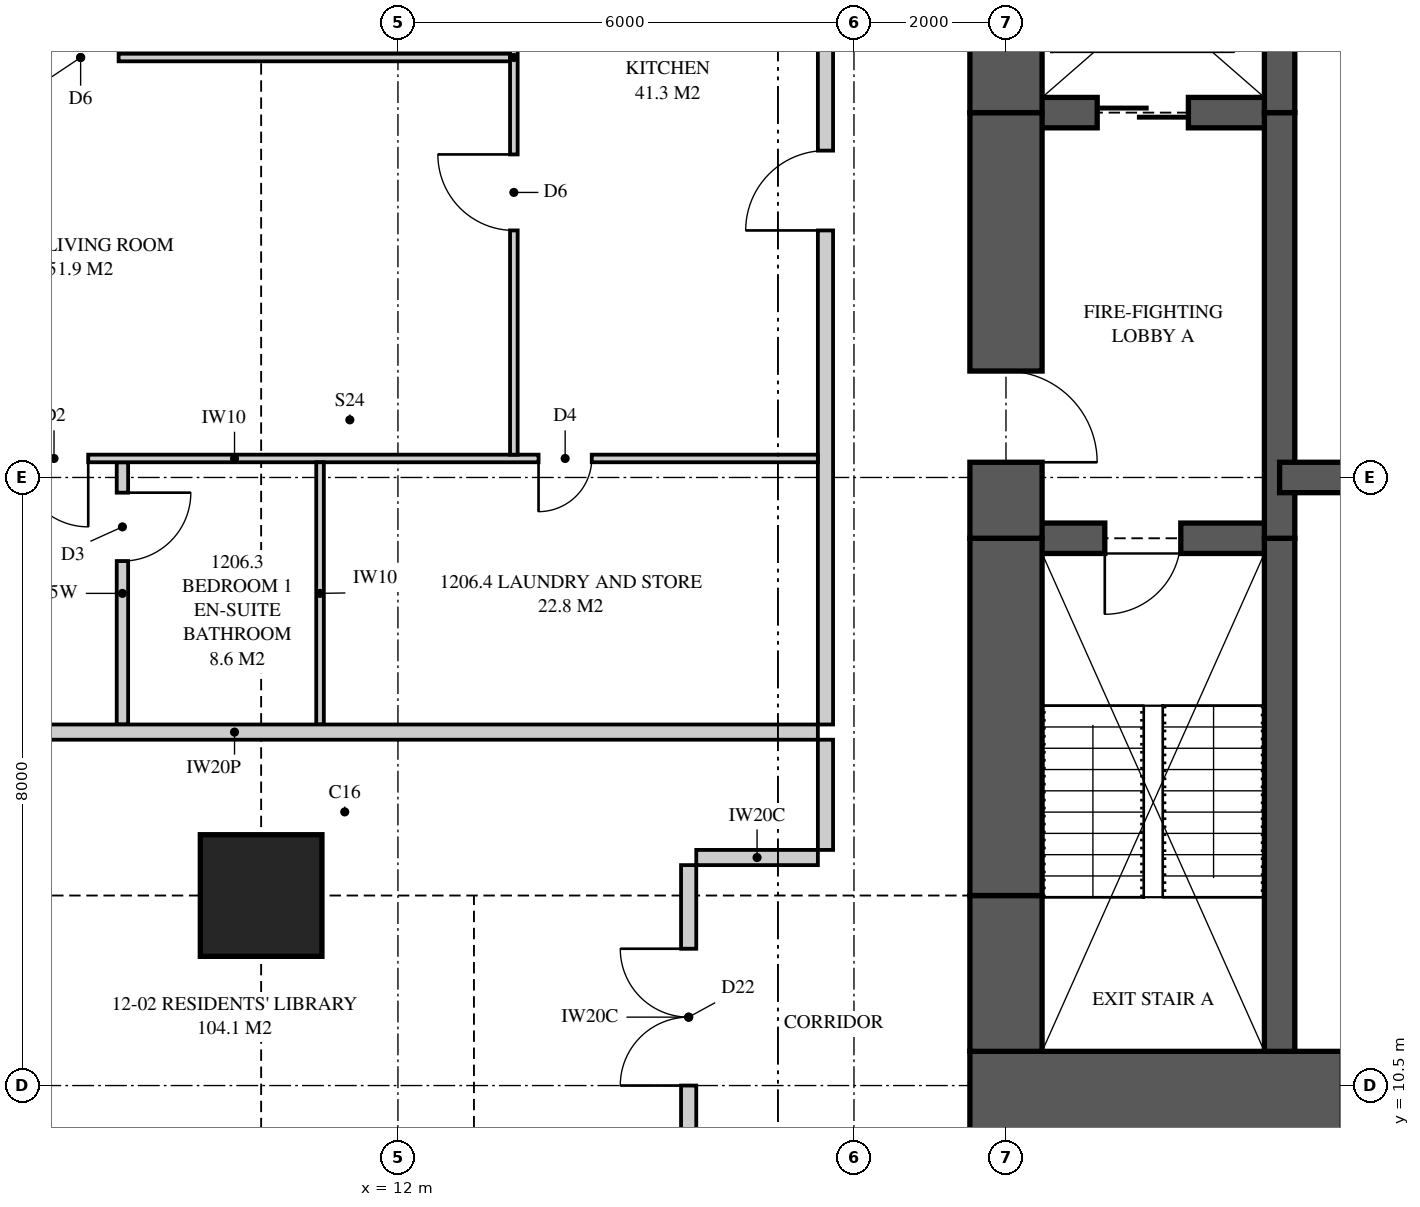
"""IFC4 building model, lengths in metres.
Left out: names, types, materials, properties, quantities, classifications, styles, units other than length and angle.
Written with IfcOpenShell. Run it as: python <this file> out.ifc"""

import sys

from ifc_helpers import new_model, si_unit, direction, frame, frame_2d, origin, origin_2d, place, context, subcontext, project, spatial, polyline, rectangle, outline, extrude, element, fill, save


model = new_model("IFC4")
c1 = context("Model", 3, precision=1e-05, world=origin(), true_north=direction((0.0, 1.0)))
c2 = subcontext(c1, "Body", "Model", "MODEL_VIEW")
j1 = project(units=[si_unit("LENGTHUNIT", "METRE"), si_unit("PLANEANGLEUNIT", "RADIAN")], contexts=[c1])
p1 = place(None, origin())
s1 = spatial("IfcSite", under=j1, at=p1, CompositionType="ELEMENT")
p2 = place(p1, origin())
s2 = spatial("IfcBuilding", under=s1, at=p2, CompositionType="ELEMENT")
p3 = place(p2, frame((0.0, 0.0, 47.8)))
s3 = spatial("IfcBuildingStorey", under=s2, at=p3, CompositionType="ELEMENT", Elevation=47.8)
p4 = place(p3, frame((10.2, 13.0, 0.0), z_axis=(0.0, 0.0, 1.0), x_axis=(1.0, 0.0, 0.0)))
e1 = element("IfcColumn", 1, at=p4, inside=s3, PredefinedType="COLUMN", context=c2, shape_type="SweptSolid", body=[
    extrude(rectangle(XDim=1.6, YDim=1.6, at=origin_2d()), origin(), (0.0, 0.0, 1.0), 3.35),
])
p5 = place(p3, frame((19.525, 10.125, 0.0), z_axis=(0.0, 0.0, 1.0), x_axis=(1.0, 0.0, 0.0)))
e2 = element("IfcWall", 2, at=p5, inside=s3, PredefinedType="SHEAR", context=c2, shape_type="SweptSolid", body=[
    extrude(rectangle(XDim=6.475, YDim=1.65, at=frame_2d((3.238, 0.0))), origin(), (0.0, 0.0, 1.0), 3.35),
])
p6 = place(p5, frame((4.9, 0.0, 0.0)))
e3 = element("IfcOpeningElement", 3, at=p6, cuts=e2, PredefinedType="OPENING", context=c2, shape_type="SweptSolid", body=[
    extrude(rectangle(XDim=0.75, YDim=2.1, at=frame_2d((0.375, 1.05))), frame((0.0, 0.835, 0.0), z_axis=(0.0, -1.0, 0.0), x_axis=(1.0, 0.0, 0.0)), (0.0, 0.0, 1.0), 1.67),
])
p7 = place(p3, frame((20.0, 26.05, 0.0), z_axis=(0.0, 0.0, 1.0), x_axis=(0.0, -1.0, 0.0)))
e4 = element("IfcWall", 4, at=p7, inside=s3, PredefinedType="SHEAR", context=c2, shape_type="SweptSolid", body=[
    extrude(rectangle(XDim=2.75, YDim=0.95, at=frame_2d((1.375, 0.0))), origin(), (0.0, 0.0, 1.0), 3.35),
])
p8 = place(p3, frame((20.0, 23.3, 0.0), z_axis=(0.0, 0.0, 1.0), x_axis=(0.0, -1.0, 0.0)))
e5 = element("IfcWall", 5, at=p8, inside=s3, PredefinedType="SHEAR", context=c2, shape_type="SweptSolid", body=[
    extrude(rectangle(XDim=5.6, YDim=0.95, at=frame_2d((2.8, 0.0))), origin(), (0.0, 0.0, 1.0), 3.35),
])
p9 = place(p8, frame((3.4, 0.0, 0.0)))
e6 = element("IfcOpeningElement", 6, at=p9, cuts=e5, PredefinedType="OPENING", context=c2, shape_type="SweptSolid", body=[
    extrude(rectangle(XDim=1.2, YDim=2.2, at=frame_2d((0.6, 1.1))), frame((0.0, 0.485, 0.0), z_axis=(0.0, -1.0, 0.0), x_axis=(1.0, 0.0, 0.0)), (0.0, 0.0, 1.0), 0.97),
])
p10 = place(p3, frame((20.0, 17.7, 0.0), z_axis=(0.0, 0.0, 1.0), x_axis=(0.0, -1.0, 0.0)))
e7 = element("IfcWall", 7, at=p10, inside=s3, PredefinedType="SHEAR", context=c2, shape_type="SweptSolid", body=[
    extrude(rectangle(XDim=4.7, YDim=0.95, at=frame_2d((2.35, 0.0))), origin(), (0.0, 0.0, 1.0), 3.35),
])
p11 = place(p3, frame((20.0, 13.0, 0.0), z_axis=(0.0, 0.0, 1.0), x_axis=(0.0, -1.0, 0.0)))
e8 = element("IfcWall", 8, at=p11, inside=s3, PredefinedType="SHEAR", context=c2, shape_type="SweptSolid", body=[
    extrude(rectangle(XDim=2.05, YDim=0.95, at=frame_2d((1.025, 0.0))), origin(), (0.0, 0.0, 1.0), 3.35),
])
p12 = place(p3, frame((23.6, 10.95, 0.0), z_axis=(0.0, 0.0, 1.0), x_axis=(0.0, 1.0, 0.0)))
e9 = element("IfcWall", 9, at=p12, inside=s3, PredefinedType="SHEAR", context=c2, shape_type="SweptSolid", body=[
    extrude(rectangle(XDim=6.75, YDim=0.4, at=frame_2d((3.375, 0.0))), origin(), (0.0, 0.0, 1.0), 3.35),
])
p13 = place(p3, frame((23.6, 17.7, 0.0), z_axis=(0.0, 0.0, 1.0), x_axis=(0.0, 1.0, 0.0)))
e10 = element("IfcWall", 10, at=p13, inside=s3, PredefinedType="SHEAR", context=c2, shape_type="SweptSolid", body=[
    extrude(rectangle(XDim=5.6, YDim=0.4, at=frame_2d((2.8, 0.0))), origin(), (0.0, 0.0, 1.0), 3.35),
])
p14 = place(p3, frame((23.6, 23.3, 0.0), z_axis=(0.0, 0.0, 1.0), x_axis=(0.0, 1.0, 0.0)))
e11 = element("IfcWall", 11, at=p14, inside=s3, PredefinedType="SHEAR", context=c2, shape_type="SweptSolid", body=[
    extrude(rectangle(XDim=2.75, YDim=0.4, at=frame_2d((1.375, 0.0))), origin(), (0.0, 0.0, 1.0), 3.35),
])
p15 = place(p3, frame((20.0, 17.7, 0.0), z_axis=(0.0, 0.0, 1.0), x_axis=(1.0, 0.0, 0.0)))
e12 = element("IfcWall", 12, at=p15, inside=s3, PredefinedType="SHEAR", context=c2, shape_type="SweptSolid", body=[
    extrude(rectangle(XDim=3.6, YDim=0.4, at=frame_2d((1.8, 0.0))), origin(), (0.0, 0.0, 1.0), 3.35),
])
p16 = place(p15, frame((1.3, 0.0, 0.0)))
e13 = element("IfcOpeningElement", 13, at=p16, cuts=e12, PredefinedType="OPENING", context=c2, shape_type="SweptSolid", body=[
    extrude(rectangle(XDim=1.0, YDim=2.1, at=frame_2d((0.5, 1.05))), frame((0.0, 0.21, 0.0), z_axis=(0.0, -1.0, 0.0), x_axis=(1.0, 0.0, 0.0)), (0.0, 0.0, 1.0), 0.42),
])
p17 = place(p3, frame((20.0, 23.3, 0.0), z_axis=(0.0, 0.0, 1.0), x_axis=(1.0, 0.0, 0.0)))
e14 = element("IfcWall", 14, at=p17, inside=s3, PredefinedType="SHEAR", context=c2, shape_type="SweptSolid", body=[
    extrude(rectangle(XDim=3.6, YDim=0.4, at=frame_2d((1.8, 0.0))), origin(), (0.0, 0.0, 1.0), 3.35),
])
p18 = place(p17, frame((1.2, 0.0, 0.0)))
e15 = element("IfcOpeningElement", 15, at=p18, cuts=e14, PredefinedType="OPENING", context=c2, shape_type="SweptSolid", body=[
    extrude(rectangle(XDim=1.2, YDim=2.1, at=frame_2d((0.6, 1.05))), frame((0.0, 0.21, 0.0), z_axis=(0.0, -1.0, 0.0), x_axis=(1.0, 0.0, 0.0)), (0.0, 0.0, 1.0), 0.42),
])
p19 = place(p3, frame((23.6, 18.5, 0.0), z_axis=(0.0, 0.0, 1.0), x_axis=(1.0, 0.0, 0.0)))
e16 = element("IfcWall", 16, at=p19, inside=s3, PredefinedType="SHEAR", context=c2, shape_type="SweptSolid", body=[
    extrude(rectangle(XDim=2.4, YDim=0.4, at=frame_2d((1.2, 0.0))), origin(), (0.0, 0.0, 1.0), 3.35),
])
p20 = place(p3, frame((2.175, 15.15, 0.0), z_axis=(0.0, 0.0, 1.0), x_axis=(1.0, 0.0, 0.0)))
e17 = element("IfcWall", 17, at=p20, inside=s3, PredefinedType="PARTITIONING", context=c2, shape_type="SweptSolid", body=[
    extrude(outline(polyline([(0.529, 2.15), (0.0, 2.15), (0.0, 0.0), (0.529, 0.0), (0.529, 0.021), (1.021, 0.021), (1.021, 0.0), (15.35, 0.0), (15.35, 3.11), (9.335, 3.11), (9.335, 2.51), (6.715, 2.51), (6.715, 3.11), (1.685, 3.11), (1.685, 2.15), (1.021, 2.15), (1.021, 2.129), (0.529, 2.129), (0.529, 2.15)])), frame((0.0, 0.1, 0.0), z_axis=(0.0, -1.0, 0.0), x_axis=(1.0, 0.0, 0.0)), (0.0, 0.0, 1.0), 0.2),
])
p21 = place(p3, frame((17.625, 15.25, 0.0), z_axis=(0.0, 0.0, 1.0), x_axis=(0.0, 1.0, 0.0)))
e18 = element("IfcWall", 18, at=p21, inside=s3, PredefinedType="PARTITIONING", context=c2, shape_type="SweptSolid", body=[
    extrude(outline(polyline([(0.0, 0.0), (14.0, 0.0), (14.0, 3.11), (10.087, 3.11), (10.087, 2.541), (9.413, 2.541), (9.413, 3.11), (0.0, 3.11), (0.0, 0.0)])), frame((0.0, 0.1, 0.0), z_axis=(0.0, -1.0, 0.0), x_axis=(1.0, 0.0, 0.0)), (0.0, 0.0, 1.0), 0.2),
])
p22 = place(p21, frame((6.5, 0.0, 0.0)))
e19 = element("IfcOpeningElement", 19, at=p22, cuts=e18, PredefinedType="OPENING", context=c2, shape_type="SweptSolid", body=[
    extrude(rectangle(XDim=1.05, YDim=2.2, at=frame_2d((0.525, 1.1))), frame((0.0, 0.11, 0.0), z_axis=(0.0, -1.0, 0.0), x_axis=(1.0, 0.0, 0.0)), (0.0, 0.0, 1.0), 0.22),
])
p23 = place(p3, frame((2.175, 18.75, 0.0), z_axis=(0.0, 0.0, 1.0), x_axis=(1.0, 0.0, 0.0)))
e20 = element("IfcWall", 20, at=p23, inside=s3, PredefinedType="PARTITIONING", context=c2, shape_type="SweptSolid", body=[
    extrude(outline(polyline([(0.0, 0.0), (15.35, 0.0), (15.35, 3.11), (9.285, 3.11), (9.285, 2.51), (6.765, 2.51), (6.765, 3.11), (1.635, 3.11), (1.635, 2.15), (0.0, 2.15), (0.0, 3.11), (0.0, 0.0)])), frame((0.0, 0.05, 0.0), z_axis=(0.0, -1.0, 0.0), x_axis=(1.0, 0.0, 0.0)), (0.0, 0.0, 1.0), 0.1),
])
p24 = place(p23, frame((4.85, 0.0, 0.0)))
e21 = element("IfcOpeningElement", 21, at=p24, cuts=e20, PredefinedType="OPENING", context=c2, shape_type="SweptSolid", body=[
    extrude(rectangle(XDim=0.9, YDim=2.1, at=frame_2d((0.45, 1.05))), frame((0.0, 0.06, 0.0), z_axis=(0.0, -1.0, 0.0), x_axis=(1.0, 0.0, 0.0)), (0.0, 0.0, 1.0), 0.12),
])
p25 = place(p23, frame((11.675, 0.0, 0.0)))
e22 = element("IfcOpeningElement", 22, at=p25, cuts=e20, PredefinedType="OPENING", context=c2, shape_type="SweptSolid", body=[
    extrude(rectangle(XDim=0.7, YDim=2.1, at=frame_2d((0.35, 1.05))), frame((0.0, 0.06, 0.0), z_axis=(0.0, -1.0, 0.0), x_axis=(1.0, 0.0, 0.0)), (0.0, 0.0, 1.0), 0.12),
])
p26 = place(p3, frame((8.375, 15.25, 0.0), z_axis=(0.0, 0.0, 1.0), x_axis=(0.0, 1.0, 0.0)))
e23 = element("IfcWall", 23, at=p26, inside=s3, PredefinedType="PLUMBINGWALL", context=c2, shape_type="SweptSolid", body=[
    extrude(rectangle(XDim=3.45, YDim=0.15, at=frame_2d((1.725, 0.0))), origin(), (0.0, 0.0, 1.0), 3.11),
])
p27 = place(p26, frame((2.15, 0.0, 0.0)))
e24 = element("IfcOpeningElement", 24, at=p27, cuts=e23, PredefinedType="OPENING", context=c2, shape_type="SweptSolid", body=[
    extrude(rectangle(XDim=0.9, YDim=2.1, at=frame_2d((0.45, 1.05))), frame((0.0, 0.085, 0.0), z_axis=(0.0, -1.0, 0.0), x_axis=(1.0, 0.0, 0.0)), (0.0, 0.0, 1.0), 0.17),
])
p28 = place(p3, frame((10.975, 15.25, 0.0), z_axis=(0.0, 0.0, 1.0), x_axis=(0.0, 1.0, 0.0)))
e25 = element("IfcWall", 25, at=p28, inside=s3, PredefinedType="PARTITIONING", context=c2, shape_type="SweptSolid", body=[
    extrude(outline(polyline([(0.0, 0.0), (3.45, 0.0), (3.45, 3.11), (3.45, 2.51), (0.0, 2.51), (0.0, 3.11), (0.0, 0.0)])), frame((0.0, 0.05, 0.0), z_axis=(0.0, -1.0, 0.0), x_axis=(1.0, 0.0, 0.0)), (0.0, 0.0, 1.0), 0.1),
])
p29 = place(p3, frame((13.525, 18.8, 0.0), z_axis=(0.0, 0.0, 1.0), x_axis=(0.0, 1.0, 0.0)))
e26 = element("IfcWall", 26, at=p29, inside=s3, PredefinedType="PARTITIONING", context=c2, shape_type="SweptSolid", body=[
    extrude(outline(polyline([(0.0, 0.0), (10.45, 0.0), (10.45, 3.11), (6.487, 3.11), (6.487, 2.541), (5.913, 2.541), (5.913, 3.11), (0.0, 3.11), (0.0, 0.0)])), frame((0.0, 0.05, 0.0), z_axis=(0.0, -1.0, 0.0), x_axis=(1.0, 0.0, 0.0)), (0.0, 0.0, 1.0), 0.1),
])
p30 = place(p29, frame((2.95, 0.0, 0.0)))
e27 = element("IfcOpeningElement", 27, at=p30, cuts=e26, PredefinedType="OPENING", context=c2, shape_type="SweptSolid", body=[
    extrude(rectangle(XDim=1.0, YDim=2.1, at=frame_2d((0.5, 1.05))), frame((0.0, 0.06, 0.0), z_axis=(0.0, -1.0, 0.0), x_axis=(1.0, 0.0, 0.0)), (0.0, 0.0, 1.0), 0.12),
])
p31 = place(p3, frame((2.175, 24.025, 0.0), z_axis=(0.0, 0.0, 1.0), x_axis=(1.0, 0.0, 0.0)))
e28 = element("IfcWall", 28, at=p31, inside=s3, PredefinedType="PARTITIONING", context=c2, shape_type="SweptSolid", body=[
    extrude(outline(polyline([(0.529, 2.15), (0.0, 2.15), (0.0, 0.0), (0.529, 0.0), (0.529, 0.798), (1.021, 0.798), (1.021, 0.0), (11.3, 0.0), (11.3, 3.11), (9.285, 3.11), (9.285, 2.51), (6.765, 2.51), (6.765, 3.11), (1.635, 3.11), (1.635, 2.15), (1.021, 2.15), (1.021, 1.352), (0.529, 1.352), (0.529, 2.15)])), frame((0.0, 0.05, 0.0), z_axis=(0.0, -1.0, 0.0), x_axis=(1.0, 0.0, 0.0)), (0.0, 0.0, 1.0), 0.1),
])
p32 = place(p31, frame((5.15, 0.0, 0.0)))
e29 = element("IfcOpeningElement", 29, at=p32, cuts=e28, PredefinedType="OPENING", context=c2, shape_type="SweptSolid", body=[
    extrude(rectangle(XDim=1.0, YDim=2.1, at=frame_2d((0.5, 1.05))), frame((0.0, 0.06, 0.0), z_axis=(0.0, -1.0, 0.0), x_axis=(1.0, 0.0, 0.0)), (0.0, 0.0, 1.0), 0.12),
])
p33 = place(p3, frame((17.625, 13.6, 0.0), z_axis=(0.0, 0.0, 1.0), x_axis=(0.0, 1.0, 0.0)))
e30 = element("IfcWall", 30, at=p33, inside=s3, PredefinedType="PARTITIONING", context=c2, shape_type="SweptSolid", body=[
    extrude(rectangle(XDim=1.45, YDim=0.2, at=frame_2d((0.725, 0.0))), origin(), (0.0, 0.0, 1.0), 3.11),
])
p34 = place(p3, frame((15.825, 9.4, 0.0), z_axis=(0.0, 0.0, 1.0), x_axis=(0.0, 1.0, 0.0)))
e31 = element("IfcWall", 31, at=p34, inside=s3, PredefinedType="PARTITIONING", context=c2, shape_type="SweptSolid", body=[
    extrude(outline(polyline([(0.0, 0.0), (4.0, 0.0), (4.0, 3.11), (3.937, 3.11), (3.937, 2.541), (3.263, 2.541), (3.263, 3.11), (0.0, 3.11), (0.0, 0.0)])), frame((0.0, 0.1, 0.0), z_axis=(0.0, -1.0, 0.0), x_axis=(1.0, 0.0, 0.0)), (0.0, 0.0, 1.0), 0.2),
])
p35 = place(p34, frame((1.1, 0.0, 0.0)))
e32 = element("IfcOpeningElement", 32, at=p35, cuts=e31, PredefinedType="OPENING", context=c2, shape_type="SweptSolid", body=[
    extrude(rectangle(XDim=1.8, YDim=2.1, at=frame_2d((0.9, 1.05))), frame((0.0, 0.11, 0.0), z_axis=(0.0, -1.0, 0.0), x_axis=(1.0, 0.0, 0.0)), (0.0, 0.0, 1.0), 0.22),
])
p36 = place(p3, frame((17.525, 13.5, 0.0), z_axis=(0.0, 0.0, 1.0), x_axis=(-1.0, 0.0, 0.0)))
e33 = element("IfcWall", 33, at=p36, inside=s3, PredefinedType="PARTITIONING", context=c2, shape_type="SweptSolid", body=[
    extrude(rectangle(XDim=1.6, YDim=0.2, at=frame_2d((0.8, 0.0))), origin(), (0.0, 0.0, 1.0), 3.11),
])
p37 = place(p35, origin())
e34 = element("IfcDoor", 34, at=p37, inside=s3, OperationType="DOUBLE_DOOR_SINGLE_SWING", PredefinedType="DOOR", context=c2, shape_type="SweptSolid", body=[
    extrude(rectangle(XDim=1.8, YDim=2.1, at=frame_2d((0.9, 1.05))), frame((0.0, 0.025, 0.0), z_axis=(0.0, -1.0, 0.0), x_axis=(1.0, 0.0, 0.0)), (0.0, 0.0, 1.0), 0.05),
])
fill(e32, e34)
p38 = place(p22, origin())
e35 = element("IfcDoor", 35, at=p38, inside=s3, OperationType="SINGLE_SWING_LEFT", PredefinedType="DOOR", context=c2, shape_type="SweptSolid", body=[
    extrude(rectangle(XDim=1.05, YDim=2.2, at=frame_2d((0.525, 1.1))), frame((0.0, 0.025, 0.0), z_axis=(0.0, -1.0, 0.0), x_axis=(1.0, 0.0, 0.0)), (0.0, 0.0, 1.0), 0.05),
])
fill(e19, e35)
p39 = place(p24, frame((0.9, 0.0, 0.0), z_axis=(0.0, 0.0, 1.0), x_axis=(-1.0, 0.0, 0.0)))
e36 = element("IfcDoor", 36, at=p39, inside=s3, OperationType="SINGLE_SWING_LEFT", PredefinedType="DOOR", context=c2, shape_type="SweptSolid", body=[
    extrude(rectangle(XDim=0.9, YDim=2.1, at=frame_2d((0.45, 1.05))), frame((0.0, 0.025, 0.0), z_axis=(0.0, -1.0, 0.0), x_axis=(1.0, 0.0, 0.0)), (0.0, 0.0, 1.0), 0.05),
])
fill(e21, e36)
p40 = place(p27, frame((0.9, 0.0, 0.0), z_axis=(0.0, 0.0, 1.0), x_axis=(-1.0, 0.0, 0.0)))
e37 = element("IfcDoor", 37, at=p40, inside=s3, OperationType="SINGLE_SWING_LEFT", PredefinedType="DOOR", context=c2, shape_type="SweptSolid", body=[
    extrude(rectangle(XDim=0.9, YDim=2.1, at=frame_2d((0.45, 1.05))), frame((0.0, 0.025, 0.0), z_axis=(0.0, -1.0, 0.0), x_axis=(1.0, 0.0, 0.0)), (0.0, 0.0, 1.0), 0.05),
])
fill(e24, e37)
p41 = place(p25, frame((0.7, 0.0, 0.0), z_axis=(0.0, 0.0, 1.0), x_axis=(-1.0, 0.0, 0.0)))
e38 = element("IfcDoor", 38, at=p41, inside=s3, OperationType="SINGLE_SWING_RIGHT", PredefinedType="DOOR", context=c2, shape_type="SweptSolid", body=[
    extrude(rectangle(XDim=0.7, YDim=2.1, at=frame_2d((0.35, 1.05))), frame((0.0, 0.025, 0.0), z_axis=(0.0, -1.0, 0.0), x_axis=(1.0, 0.0, 0.0)), (0.0, 0.0, 1.0), 0.05),
])
fill(e22, e38)
p42 = place(p30, origin())
e39 = element("IfcDoor", 39, at=p42, inside=s3, OperationType="SINGLE_SWING_RIGHT", PredefinedType="DOOR", context=c2, shape_type="SweptSolid", body=[
    extrude(rectangle(XDim=1.0, YDim=2.1, at=frame_2d((0.5, 1.05))), frame((0.0, 0.025, 0.0), z_axis=(0.0, -1.0, 0.0), x_axis=(1.0, 0.0, 0.0)), (0.0, 0.0, 1.0), 0.05),
])
fill(e27, e39)
p43 = place(p32, origin())
e40 = element("IfcDoor", 40, at=p43, inside=s3, OperationType="SINGLE_SWING_LEFT", PredefinedType="DOOR", context=c2, shape_type="SweptSolid", body=[
    extrude(rectangle(XDim=1.0, YDim=2.1, at=frame_2d((0.5, 1.05))), frame((0.0, 0.025, 0.0), z_axis=(0.0, -1.0, 0.0), x_axis=(1.0, 0.0, 0.0)), (0.0, 0.0, 1.0), 0.05),
])
fill(e29, e40)
p44 = place(p16, frame((1.0, 0.0, 0.0), z_axis=(0.0, 0.0, 1.0), x_axis=(-1.0, 0.0, 0.0)))
e41 = element("IfcDoor", 41, at=p44, inside=s3, OperationType="SINGLE_SWING_RIGHT", PredefinedType="DOOR", context=c2, shape_type="SweptSolid", body=[
    extrude(rectangle(XDim=1.0, YDim=2.1, at=frame_2d((0.5, 1.05))), frame((0.0, 0.025, 0.0), z_axis=(0.0, -1.0, 0.0), x_axis=(1.0, 0.0, 0.0)), (0.0, 0.0, 1.0), 0.05),
])
fill(e13, e41)
p45 = place(p9, origin())
e42 = element("IfcDoor", 42, at=p45, inside=s3, OperationType="SINGLE_SWING_RIGHT", PredefinedType="DOOR", context=c2, shape_type="SweptSolid", body=[
    extrude(rectangle(XDim=1.2, YDim=2.2, at=frame_2d((0.6, 1.1))), frame((0.0, 0.025, 0.0), z_axis=(0.0, -1.0, 0.0), x_axis=(1.0, 0.0, 0.0)), (0.0, 0.0, 1.0), 0.05),
])
fill(e6, e42)
p46 = place(p18, origin())
e43 = element("IfcDoor", 43, at=p46, inside=s3, OperationType="SLIDING_TO_LEFT", PredefinedType="DOOR", context=c2, shape_type="SweptSolid", body=[
    extrude(rectangle(XDim=1.2, YDim=2.1, at=frame_2d((0.6, 1.05))), frame((0.0, 0.025, 0.0), z_axis=(0.0, -1.0, 0.0), x_axis=(1.0, 0.0, 0.0)), (0.0, 0.0, 1.0), 0.05),
])
fill(e15, e43)
save(model, sys.argv[1])
